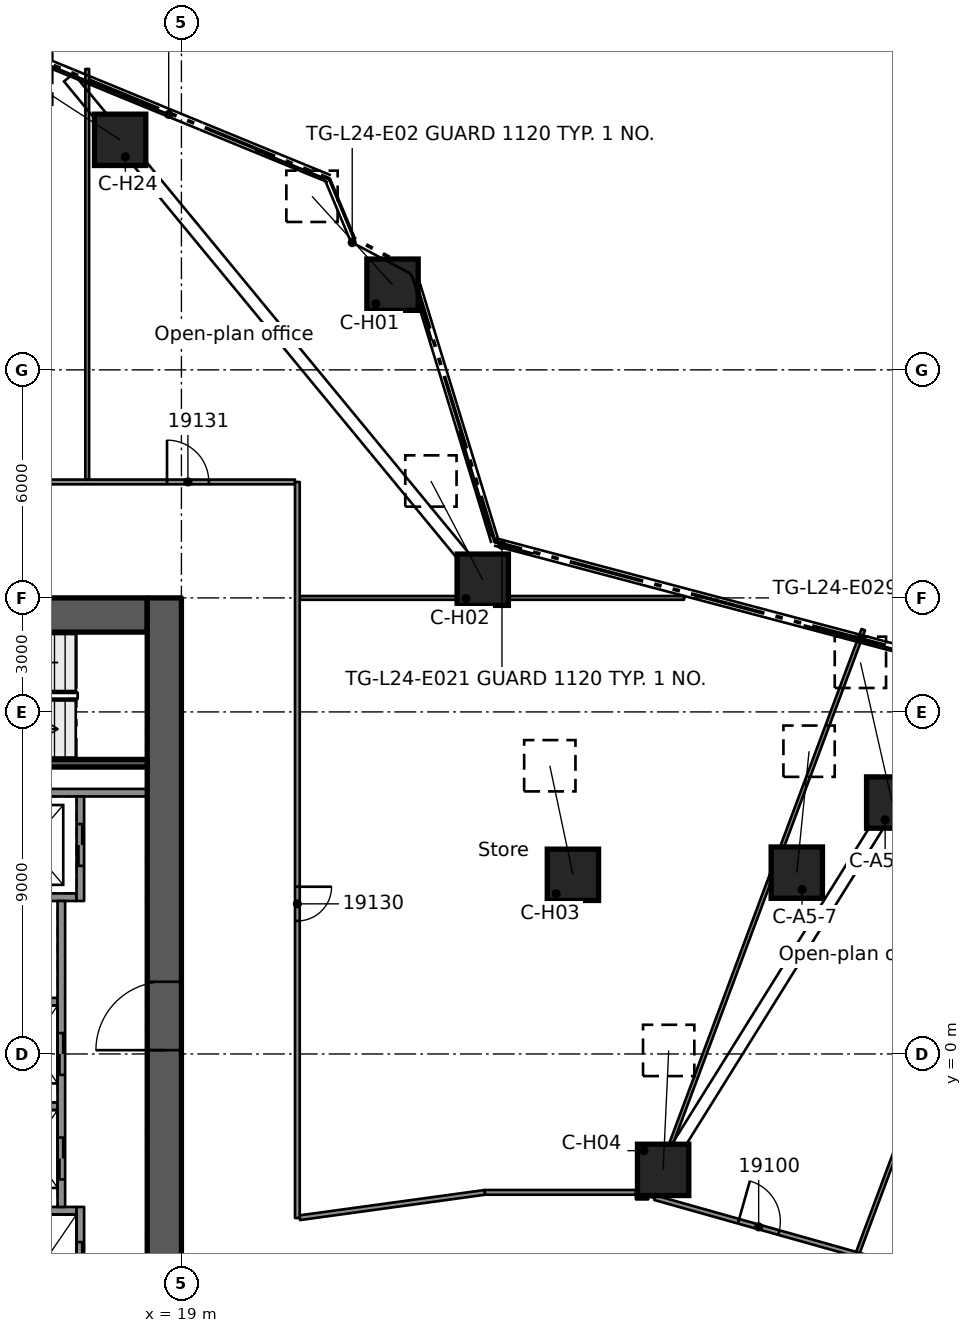
"""IFC4 building model, lengths in metres.
Left out: names, types, materials, properties, quantities, classifications, styles, units other than length and angle.
Written with IfcOpenShell. Run it as: python <this file> out.ifc"""

import sys

from ifc_helpers import new_model, si_unit, direction, frame, frame_2d, origin, origin_2d, place, context, subcontext, project, spatial, rectangle, extrude, element, fill, save


model = new_model("IFC4")
c1 = context("Model", 3, precision=1e-05, world=origin(), true_north=direction((0.0, 1.0)))
c2 = subcontext(c1, "Body", "Model", "MODEL_VIEW")
j1 = project(units=[si_unit("LENGTHUNIT", "METRE"), si_unit("PLANEANGLEUNIT", "RADIAN")], contexts=[c1])
p1 = place(None, origin())
s1 = spatial("IfcSite", under=j1, at=p1, CompositionType="ELEMENT")
p2 = place(p1, origin())
s2 = spatial("IfcBuilding", under=s1, at=p2, CompositionType="ELEMENT")
p3 = place(p2, frame((0.0, 0.0, 98.2)))
s3 = spatial("IfcBuildingStorey", under=s2, at=p3, CompositionType="ELEMENT", Elevation=98.2)
p4 = place(p3, frame((8.9, 11.55, 0.0), z_axis=(0.0, 0.0, 1.0), x_axis=(1.0, 0.0, 0.0)))
e1 = element("IfcWall", 1, at=p4, inside=s3, PredefinedType="SHEAR", context=c2, shape_type="SweptSolid", body=[
    extrude(rectangle(XDim=9.2, YDim=0.9, at=frame_2d((4.6, 0.0))), origin(), (0.0, 0.0, 1.0), 4.0),
])
p5 = place(p4, frame((3.0, 0.0, 0.0)))
e2 = element("IfcOpeningElement", 2, at=p5, cuts=e1, PredefinedType="OPENING", context=c2, shape_type="SweptSolid", body=[
    extrude(rectangle(XDim=1.1, YDim=2.1, at=frame_2d((0.55, 1.05))), frame((0.0, 0.46, 0.0), z_axis=(0.0, -1.0, 0.0), x_axis=(1.0, 0.0, 0.0)), (0.0, 0.0, 1.0), 0.92),
])
p6 = place(p4, frame((0.77, 0.0, 0.0)))
e3 = element("IfcOpeningElement", 3, at=p6, cuts=e1, PredefinedType="OPENING", context=c2, shape_type="SweptSolid", body=[
    extrude(rectangle(XDim=0.9, YDim=2.1, at=frame_2d((0.45, 1.05))), frame((0.0, 0.46, 0.0), z_axis=(0.0, -1.0, 0.0), x_axis=(1.0, 0.0, 0.0)), (0.0, 0.0, 1.0), 0.92),
])
p7 = place(p3, frame((18.55, -12.0, 0.0), z_axis=(0.0, 0.0, 1.0), x_axis=(0.0, 1.0, 0.0)))
e4 = element("IfcWall", 4, at=p7, inside=s3, PredefinedType="SHEAR", context=c2, shape_type="SweptSolid", body=[
    extrude(rectangle(XDim=24.0, YDim=0.9, at=frame_2d((12.0, 0.0))), origin(), (0.0, 0.0, 1.0), 4.0),
])
p8 = place(p7, frame((12.1, 0.0, 0.0)))
e5 = element("IfcOpeningElement", 5, at=p8, cuts=e4, PredefinedType="OPENING", context=c2, shape_type="SweptSolid", body=[
    extrude(rectangle(XDim=1.8, YDim=2.1, at=frame_2d((0.9, 1.05))), frame((0.0, 0.46, 0.0), z_axis=(0.0, -1.0, 0.0), x_axis=(1.0, 0.0, 0.0)), (0.0, 0.0, 1.0), 0.92),
])
p9 = place(p3, frame((37.704, 6.615, 0.533), z_axis=(-0.174865419339, 0.770754140535, 0.612666418181), x_axis=(-0.975216452063, -0.221252958457, 0.0)))
e6 = element("IfcColumn", 6, at=p9, inside=s3, PredefinedType="COLUMN", context=c2, shape_type="SweptSolid", body=[
    extrude(rectangle(XDim=1.35, YDim=1.35, at=origin_2d()), origin(), (0.0, 0.0, 1.0), 4.787),
])
p10 = place(p3, frame((35.193, 4.771, 0.492), z_axis=(0.073314548038, 0.725221081003, 0.684601607298), x_axis=(-0.994928969768, 0.100580043326, 0.0)))
e7 = element("IfcColumn", 7, at=p10, inside=s3, PredefinedType="COLUMN", context=c2, shape_type="SweptSolid", body=[
    extrude(rectangle(XDim=1.35, YDim=1.35, at=origin_2d()), origin(), (0.0, 0.0, 1.0), 4.406),
])
p11 = place(p3, frame((24.555, 20.241, 0.486), z_axis=(-0.485285534425, 0.532701381088, 0.693344927626), x_axis=(-0.739240974363, -0.673441000997, 0.0)))
e8 = element("IfcColumn", 8, at=p11, inside=s3, PredefinedType="COLUMN", context=c2, shape_type="SweptSolid", body=[
    extrude(rectangle(XDim=1.35, YDim=1.35, at=origin_2d()), origin(), (0.0, 0.0, 1.0), 4.366),
])
p12 = place(p3, frame((26.929, 12.478, 0.467), z_axis=(-0.32137646831, 0.612093610038, 0.722536212357), x_axis=(-0.885381636401, -0.464864881362, 0.0)))
e9 = element("IfcColumn", 9, at=p12, inside=s3, PredefinedType="COLUMN", context=c2, shape_type="SweptSolid", body=[
    extrude(rectangle(XDim=1.35, YDim=1.35, at=origin_2d()), origin(), (0.0, 0.0, 1.0), 4.244),
])
p13 = place(p3, frame((29.302, 4.714, 0.467), z_axis=(-0.14323977711, 0.676218305191, 0.722641799218), x_axis=(-0.97829295653, -0.207226666249, 0.0)))
e10 = element("IfcColumn", 10, at=p13, inside=s3, PredefinedType="COLUMN", context=c2, shape_type="SweptSolid", body=[
    extrude(rectangle(XDim=1.35, YDim=1.35, at=origin_2d()), origin(), (0.0, 0.0, 1.0), 4.244),
])
p14 = place(p3, frame((31.676, -3.05, 0.486), z_axis=(0.03343666302, 0.719838795512, 0.693335487366), x_axis=(-0.998922931625, 0.046400179673, 0.0)))
e11 = element("IfcColumn", 11, at=p14, inside=s3, PredefinedType="COLUMN", context=c2, shape_type="SweptSolid", body=[
    extrude(rectangle(XDim=1.35, YDim=1.35, at=origin_2d()), origin(), (0.0, 0.0, 1.0), 4.366),
])
p15 = place(p3, frame((17.387, 24.053, 0.467), z_axis=(-0.57958595143, 0.376765381289, 0.722584232023), x_axis=(-0.54502344735, -0.838420802366, 0.0)))
e12 = element("IfcColumn", 12, at=p15, inside=s3, PredefinedType="COLUMN", context=c2, shape_type="SweptSolid", body=[
    extrude(rectangle(XDim=1.35, YDim=1.35, at=origin_2d()), origin(), (0.0, 0.0, 1.0), 4.244),
])
p16 = place(p3, frame((11.54, 6.875, 0.0), z_axis=(0.0, 0.0, 1.0), x_axis=(1.0, 0.0, 0.0)))
e13 = element("IfcWall", 13, at=p16, inside=s3, PredefinedType="SOLIDWALL", context=c2, shape_type="SweptSolid", body=[
    extrude(rectangle(XDim=6.56, YDim=0.2, at=frame_2d((3.28, 0.0))), origin(), (0.0, 0.0, 1.0), 3.59),
])
p17 = place(p3, frame((11.54, 4.125, 0.0), z_axis=(0.0, 0.0, 1.0), x_axis=(1.0, 0.0, 0.0)))
e14 = element("IfcWall", 14, at=p17, inside=s3, PredefinedType="SOLIDWALL", context=c2, shape_type="SweptSolid", body=[
    extrude(rectangle(XDim=4.7, YDim=0.2, at=frame_2d((2.35, 0.0))), origin(), (0.0, 0.0, 1.0), 3.59),
])
for number, where, z_axis, x_axis in (
    (15, (11.54, 1.375, 0.0), (0.0, 0.0, 1.0), (1.0, 0.0, 0.0)),
    (16, (11.54, -1.375, 0.0), (0.0, 0.0, 1.0), (1.0, 0.0, 0.0)),
):
    element("IfcWall", number, at=place(p3, frame(where, z_axis=z_axis, x_axis=x_axis)), inside=s3, PredefinedType="SOLIDWALL", context=c2, shape_type="SweptSolid", body=[
        extrude(rectangle(XDim=4.2, YDim=0.2, at=frame_2d((2.1, 0.0))), origin(), (0.0, 0.0, 1.0), 3.59),
    ])
p18 = place(p3, frame((11.54, -4.125, 0.0), z_axis=(0.0, 0.0, 1.0), x_axis=(1.0, 0.0, 0.0)))
e17 = element("IfcWall", 17, at=p18, inside=s3, PredefinedType="SOLIDWALL", context=c2, shape_type="SweptSolid", body=[
    extrude(rectangle(XDim=4.7, YDim=0.2, at=frame_2d((2.35, 0.0))), origin(), (0.0, 0.0, 1.0), 3.59),
])
p19 = place(p3, frame((16.34, 6.775, 0.0), z_axis=(0.0, 0.0, 1.0), x_axis=(0.0, -1.0, 0.0)))
e18 = element("IfcWall", 18, at=p19, inside=s3, PredefinedType="SOLIDWALL", context=c2, shape_type="SweptSolid", body=[
    extrude(rectangle(XDim=2.75, YDim=0.2, at=frame_2d((1.375, 0.0))), origin(), (0.0, 0.0, 1.0), 3.59),
])
p20 = place(p19, frame((0.725, 0.0, 0.0)))
e19 = element("IfcOpeningElement", 19, at=p20, cuts=e18, PredefinedType="OPENING", context=c2, shape_type="SweptSolid", body=[
    extrude(rectangle(XDim=1.1, YDim=2.1, at=frame_2d((0.55, 1.05))), frame((0.0, 0.11, 0.0), z_axis=(0.0, -1.0, 0.0), x_axis=(1.0, 0.0, 0.0)), (0.0, 0.0, 1.0), 0.22),
])
p21 = place(p3, frame((15.84, 4.025, 0.0), z_axis=(0.0, 0.0, 1.0), x_axis=(0.0, -1.0, 0.0)))
e20 = element("IfcWall", 20, at=p21, inside=s3, PredefinedType="SOLIDWALL", context=c2, shape_type="SweptSolid", body=[
    extrude(rectangle(XDim=8.05, YDim=0.2, at=frame_2d((4.025, 0.0))), origin(), (0.0, 0.0, 1.0), 3.59),
])
p22 = place(p21, frame((3.475, 0.0, 0.0)))
e21 = element("IfcOpeningElement", 21, at=p22, cuts=e20, PredefinedType="OPENING", context=c2, shape_type="SweptSolid", body=[
    extrude(rectangle(XDim=1.1, YDim=2.1, at=frame_2d((0.55, 1.05))), frame((0.0, 0.11, 0.0), z_axis=(0.0, -1.0, 0.0), x_axis=(1.0, 0.0, 0.0)), (0.0, 0.0, 1.0), 0.22),
])
p23 = place(p21, frame((6.225, 0.0, 0.0)))
e22 = element("IfcOpeningElement", 22, at=p23, cuts=e20, PredefinedType="OPENING", context=c2, shape_type="SweptSolid", body=[
    extrude(rectangle(XDim=1.1, YDim=2.1, at=frame_2d((0.55, 1.05))), frame((0.0, 0.11, 0.0), z_axis=(0.0, -1.0, 0.0), x_axis=(1.0, 0.0, 0.0)), (0.0, 0.0, 1.0), 0.22),
])
p24 = place(p3, frame((16.34, -4.025, 0.0), z_axis=(0.0, 0.0, 1.0), x_axis=(0.0, -1.0, 0.0)))
e23 = element("IfcWall", 23, at=p24, inside=s3, PredefinedType="SOLIDWALL", context=c2, shape_type="SweptSolid", body=[
    extrude(rectangle(XDim=2.75, YDim=0.2, at=frame_2d((1.375, 0.0))), origin(), (0.0, 0.0, 1.0), 3.59),
])
p25 = place(p24, frame((0.925, 0.0, 0.0)))
e24 = element("IfcOpeningElement", 24, at=p25, cuts=e23, PredefinedType="OPENING", context=c2, shape_type="SweptSolid", body=[
    extrude(rectangle(XDim=1.1, YDim=2.1, at=frame_2d((0.55, 1.05))), frame((0.0, 0.11, 0.0), z_axis=(0.0, -1.0, 0.0), x_axis=(1.0, 0.0, 0.0)), (0.0, 0.0, 1.0), 0.22),
])
p26 = place(p3, frame((11.54, 7.65, 0.0), z_axis=(0.0, 0.0, 1.0), x_axis=(1.0, 0.0, 0.0)))
e25 = element("IfcWall", 25, at=p26, inside=s3, PredefinedType="SOLIDWALL", context=c2, shape_type="SweptSolid", body=[
    extrude(rectangle(XDim=6.56, YDim=0.2, at=frame_2d((3.28, 0.0))), origin(), (0.0, 0.0, 1.0), 3.59),
])
p27 = place(p3, frame((31.458, -3.782, 0.0), z_axis=(0.0, 0.0, 1.0), x_axis=(0.962639522341, -0.270786170301, 0.0)))
e26 = element("IfcWall", 26, at=p27, inside=s3, PredefinedType="PARTITIONING", context=c2, shape_type="SweptSolid", body=[
    extrude(rectangle(XDim=10.798, YDim=0.125, at=frame_2d((5.399, 0.0))), origin(), (0.0, 0.0, 1.0), 3.58),
])
p28 = place(p27, frame((2.288, 0.0, 0.0)))
e27 = element("IfcOpeningElement", 27, at=p28, cuts=e26, PredefinedType="OPENING", context=c2, shape_type="SweptSolid", body=[
    extrude(rectangle(XDim=1.1, YDim=2.1, at=frame_2d((0.55, 1.05))), frame((0.0, 0.073, 0.0), z_axis=(0.0, -1.0, 0.0), x_axis=(1.0, 0.0, 0.0)), (0.0, 0.0, 1.0), 0.145),
])
p29 = place(p27, frame((8.629, 0.0, 0.0)))
e28 = element("IfcOpeningElement", 28, at=p29, cuts=e26, PredefinedType="OPENING", context=c2, shape_type="SweptSolid", body=[
    extrude(rectangle(XDim=1.1, YDim=2.1, at=frame_2d((0.55, 1.05))), frame((0.0, 0.073, 0.0), z_axis=(0.0, -1.0, 0.0), x_axis=(1.0, 0.0, 0.0)), (0.0, 0.0, 1.0), 0.145),
])
p30 = place(p3, frame((30.961, -3.764, 0.0), z_axis=(0.0, 0.0, 1.0), x_axis=(1.0, 0.0, 0.0)))
e29 = element("IfcWall", 29, at=p30, inside=s3, PredefinedType="PARTITIONING", context=c2, shape_type="SweptSolid", body=[
    extrude(rectangle(XDim=0.323, YDim=0.125, at=frame_2d((0.162, 0.0))), origin(), (0.0, 0.0, 1.0), 3.58),
])
p31 = place(p3, frame((26.982, -3.641, 0.0), z_axis=(0.0, 0.0, 1.0), x_axis=(1.0, 0.0, 0.0)))
e30 = element("IfcWall", 30, at=p31, inside=s3, PredefinedType="PARTITIONING", context=c2, shape_type="SweptSolid", body=[
    extrude(rectangle(XDim=3.978, YDim=0.125, at=frame_2d((1.989, 0.0))), origin(), (0.0, 0.0, 1.0), 3.58),
])
p32 = place(p3, frame((22.113, 12.0, 0.0), z_axis=(0.0, 0.0, 1.0), x_axis=(1.0, 0.0, 0.0)))
e31 = element("IfcWall", 31, at=p32, inside=s3, PredefinedType="PARTITIONING", context=c2, shape_type="SweptSolid", body=[
    extrude(rectangle(XDim=10.113, YDim=0.1, at=frame_2d((5.057, 0.0))), origin(), (0.0, 0.0, 1.0), 3.58),
])
p33 = place(p3, frame((10.991, 15.051, 0.0), z_axis=(0.0, 0.0, 1.0), x_axis=(1.0, 0.0, 0.0)))
e32 = element("IfcWall", 32, at=p33, inside=s3, PredefinedType="PARTITIONING", context=c2, shape_type="SweptSolid", body=[
    extrude(rectangle(XDim=10.997, YDim=0.125, at=frame_2d((5.499, 0.0))), origin(), (0.0, 0.0, 1.0), 3.58),
])
p34 = place(p33, frame((7.63, 0.0, 0.0)))
e33 = element("IfcOpeningElement", 33, at=p34, cuts=e32, PredefinedType="OPENING", context=c2, shape_type="SweptSolid", body=[
    extrude(rectangle(XDim=1.1, YDim=2.1, at=frame_2d((0.55, 1.05))), frame((0.0, 0.073, 0.0), z_axis=(0.0, -1.0, 0.0), x_axis=(1.0, 0.0, 0.0)), (0.0, 0.0, 1.0), 0.145),
])
p35 = place(p3, frame((22.113, -4.309, 0.0), z_axis=(0.0, 0.0, 1.0), x_axis=(0.99074684638, 0.135722829279, 0.0)))
e34 = element("IfcWall", 34, at=p35, inside=s3, PredefinedType="PARTITIONING", context=c2, shape_type="SweptSolid", body=[
    extrude(rectangle(XDim=4.914, YDim=0.125, at=frame_2d((2.457, 0.0))), origin(), (0.0, 0.0, 1.0), 3.58),
])
p36 = place(p3, frame((36.803, -5.22, 0.0), z_axis=(0.0, 0.0, 1.0), x_axis=(0.350173943888, 0.936684690289, 0.0)))
e35 = element("IfcWall", 35, at=p36, inside=s3, PredefinedType="PARTITIONING", context=c2, shape_type="SweptSolid", body=[
    extrude(rectangle(XDim=15.952, YDim=0.1, at=frame_2d((7.976, 0.0))), origin(), (0.0, 0.0, 1.0), 3.58),
])
p37 = place(p3, frame((31.361, -3.764, 0.0), z_axis=(0.0, 0.0, 1.0), x_axis=(0.35022519788, 0.936665527694, 0.0)))
e36 = element("IfcWall", 36, at=p37, inside=s3, PredefinedType="PARTITIONING", context=c2, shape_type="SweptSolid", body=[
    extrude(rectangle(XDim=15.938, YDim=0.1, at=frame_2d((7.969, 0.0))), origin(), (0.0, 0.0, 1.0), 3.58),
])
p38 = place(p3, frame((22.051, 15.05, 0.0), z_axis=(0.0, 0.0, 1.0), x_axis=(0.0, -1.0, 0.0)))
e37 = element("IfcWall", 37, at=p38, inside=s3, PredefinedType="PARTITIONING", context=c2, shape_type="SweptSolid", body=[
    extrude(rectangle(XDim=19.367, YDim=0.125, at=frame_2d((9.684, 0.0))), origin(), (0.0, 0.0, 1.0), 3.58),
])
p39 = place(p38, frame((10.65, 0.0, 0.0)))
e38 = element("IfcOpeningElement", 38, at=p39, cuts=e37, PredefinedType="OPENING", context=c2, shape_type="SweptSolid", body=[
    extrude(rectangle(XDim=0.9, YDim=2.1, at=frame_2d((0.45, 1.05))), frame((0.0, 0.073, 0.0), z_axis=(0.0, -1.0, 0.0), x_axis=(1.0, 0.0, 0.0)), (0.0, 0.0, 1.0), 0.145),
])
p40 = place(p3, frame((16.521, 15.114, 0.0), z_axis=(0.0, 0.0, 1.0), x_axis=(0.0, 1.0, 0.0)))
e39 = element("IfcWall", 39, at=p40, inside=s3, PredefinedType="PARTITIONING", context=c2, shape_type="SweptSolid", body=[
    extrude(rectangle(XDim=10.803, YDim=0.1, at=frame_2d((5.401, 0.0))), origin(), (0.0, 0.0, 1.0), 3.58),
])
p41 = place(p20, origin())
e40 = element("IfcDoor", 40, at=p41, inside=s3, OperationType="DOUBLE_DOOR_SLIDING", PredefinedType="DOOR", context=c2, shape_type="SweptSolid", body=[
    extrude(rectangle(XDim=1.1, YDim=2.1, at=frame_2d((0.55, 1.05))), frame((0.0, 0.025, 0.0), z_axis=(0.0, -1.0, 0.0), x_axis=(1.0, 0.0, 0.0)), (0.0, 0.0, 1.0), 0.05),
])
fill(e19, e40)
p42 = place(p22, origin())
e41 = element("IfcDoor", 41, at=p42, inside=s3, OperationType="DOUBLE_DOOR_SLIDING", PredefinedType="DOOR", context=c2, shape_type="SweptSolid", body=[
    extrude(rectangle(XDim=1.1, YDim=2.1, at=frame_2d((0.55, 1.05))), frame((0.0, 0.025, 0.0), z_axis=(0.0, -1.0, 0.0), x_axis=(1.0, 0.0, 0.0)), (0.0, 0.0, 1.0), 0.05),
])
fill(e21, e41)
p43 = place(p23, origin())
e42 = element("IfcDoor", 42, at=p43, inside=s3, OperationType="DOUBLE_DOOR_SLIDING", PredefinedType="DOOR", context=c2, shape_type="SweptSolid", body=[
    extrude(rectangle(XDim=1.1, YDim=2.1, at=frame_2d((0.55, 1.05))), frame((0.0, 0.025, 0.0), z_axis=(0.0, -1.0, 0.0), x_axis=(1.0, 0.0, 0.0)), (0.0, 0.0, 1.0), 0.05),
])
fill(e22, e42)
p44 = place(p25, origin())
e43 = element("IfcDoor", 43, at=p44, inside=s3, OperationType="DOUBLE_DOOR_SLIDING", PredefinedType="DOOR", context=c2, shape_type="SweptSolid", body=[
    extrude(rectangle(XDim=1.1, YDim=2.1, at=frame_2d((0.55, 1.05))), frame((0.0, 0.025, 0.0), z_axis=(0.0, -1.0, 0.0), x_axis=(1.0, 0.0, 0.0)), (0.0, 0.0, 1.0), 0.05),
])
fill(e24, e43)
p45 = place(p8, origin())
e44 = element("IfcDoor", 44, at=p45, inside=s3, OperationType="SINGLE_SWING_RIGHT", PredefinedType="DOOR", context=c2, shape_type="SweptSolid", body=[
    extrude(rectangle(XDim=1.8, YDim=2.1, at=frame_2d((0.9, 1.05))), frame((0.0, 0.025, 0.0), z_axis=(0.0, -1.0, 0.0), x_axis=(1.0, 0.0, 0.0)), (0.0, 0.0, 1.0), 0.05),
])
fill(e5, e44)
p46 = place(p28, origin())
e45 = element("IfcDoor", 45, at=p46, inside=s3, OperationType="SINGLE_SWING_LEFT", PredefinedType="DOOR", context=c2, shape_type="SweptSolid", body=[
    extrude(rectangle(XDim=1.1, YDim=2.1, at=frame_2d((0.55, 1.05))), frame((0.0, 0.025, 0.0), z_axis=(0.0, -1.0, 0.0), x_axis=(1.0, 0.0, 0.0)), (0.0, 0.0, 1.0), 0.05),
])
fill(e27, e45)
p47 = place(p39, origin())
e46 = element("IfcDoor", 46, at=p47, inside=s3, OperationType="SINGLE_SWING_RIGHT", PredefinedType="DOOR", context=c2, shape_type="SweptSolid", body=[
    extrude(rectangle(XDim=0.9, YDim=2.1, at=frame_2d((0.45, 1.05))), frame((0.0, 0.025, 0.0), z_axis=(0.0, -1.0, 0.0), x_axis=(1.0, 0.0, 0.0)), (0.0, 0.0, 1.0), 0.05),
])
fill(e38, e46)
p48 = place(p34, origin())
e47 = element("IfcDoor", 47, at=p48, inside=s3, OperationType="SINGLE_SWING_RIGHT", PredefinedType="DOOR", context=c2, shape_type="SweptSolid", body=[
    extrude(rectangle(XDim=1.1, YDim=2.1, at=frame_2d((0.55, 1.05))), frame((0.0, 0.025, 0.0), z_axis=(0.0, -1.0, 0.0), x_axis=(1.0, 0.0, 0.0)), (0.0, 0.0, 1.0), 0.05),
])
fill(e33, e47)
save(model, sys.argv[1])
